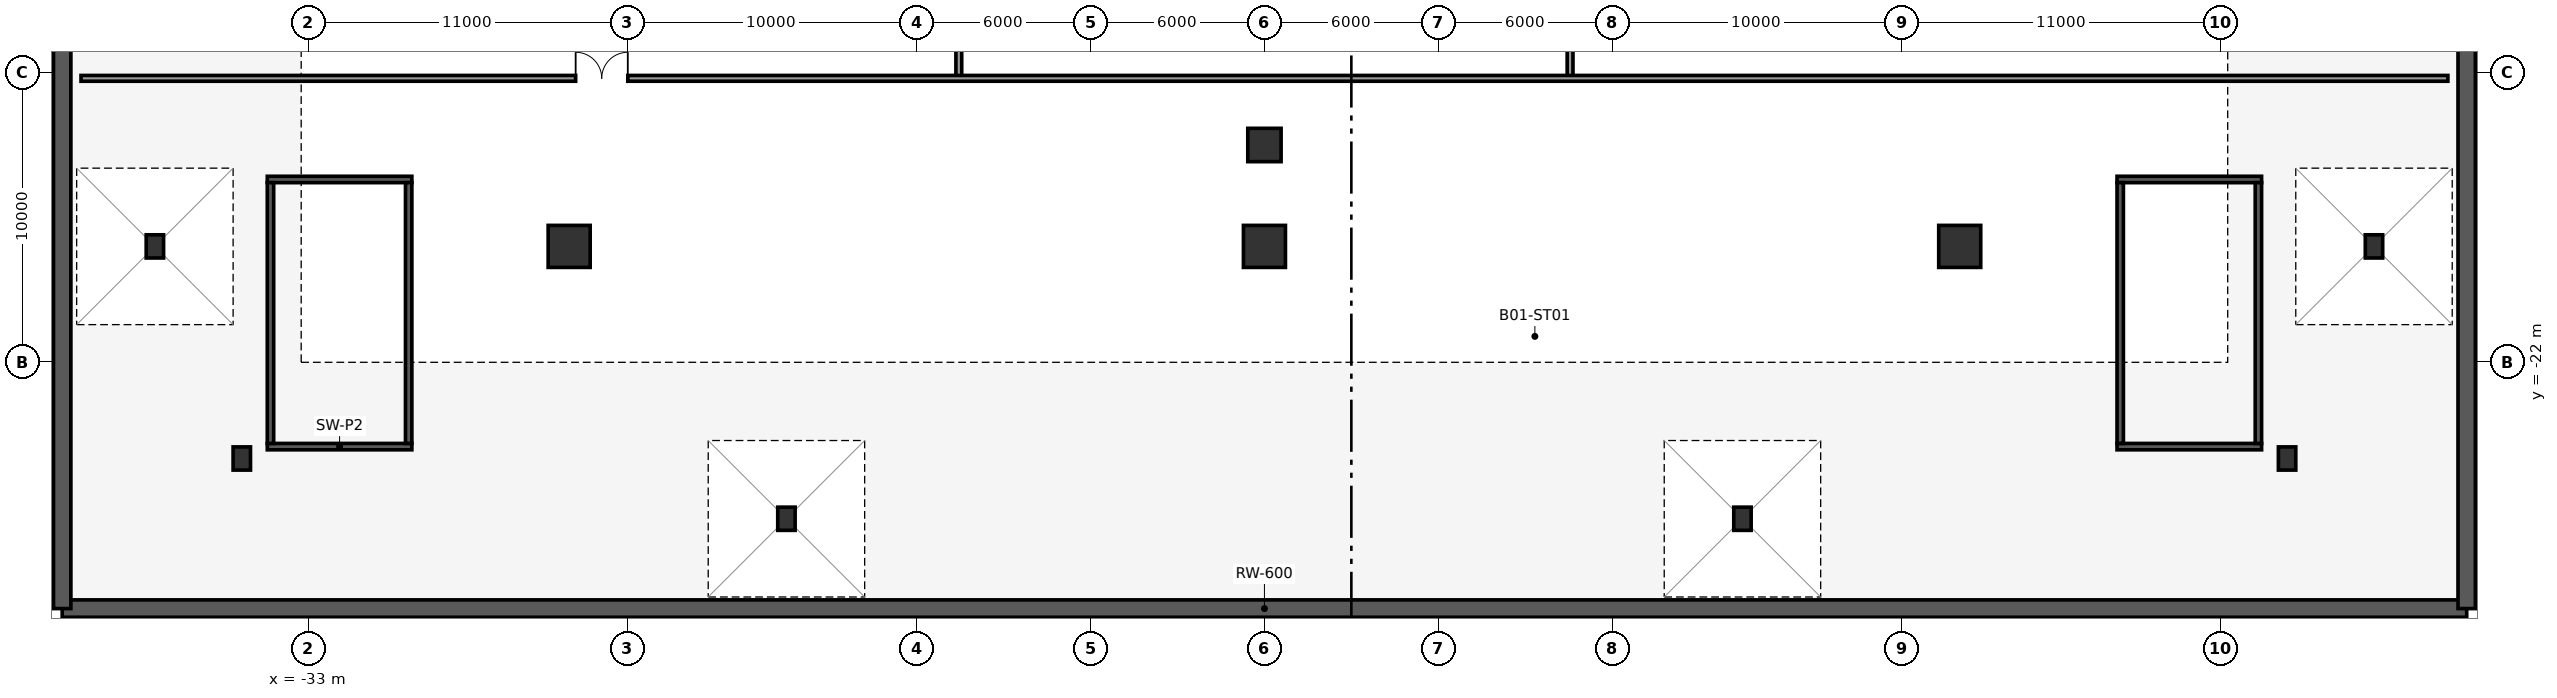
"""IFC4 building model, lengths in metres.
Left out: names, types, materials, properties, quantities, classifications, styles, units other than length and angle.
Written with IfcOpenShell. Run it as: python <this file> out.ifc"""

import sys

from ifc_helpers import new_model, si_unit, direction, frame, frame_2d, origin, origin_2d, place, context, subcontext, project, spatial, rectangle, hollow_rectangle, extrude, element, fill, save


model = new_model("IFC4")
c1 = context("Model", 3, precision=1e-05, world=origin(), true_north=direction((0.0, 1.0)))
c2 = subcontext(c1, "Body", "Model", "MODEL_VIEW")
j1 = project(units=[si_unit("LENGTHUNIT", "METRE"), si_unit("PLANEANGLEUNIT", "RADIAN")], contexts=[c1])
p1 = place(None, origin())
s1 = spatial("IfcSite", under=j1, at=p1, CompositionType="ELEMENT")
p2 = place(p1, origin())
s2 = spatial("IfcBuilding", under=s1, at=p2, CompositionType="ELEMENT")
p3 = place(p2, frame((0.0, 0.0, -5.4)))
s3 = spatial("IfcBuildingStorey", under=s2, at=p3, CompositionType="ELEMENT", Elevation=-5.4)
p4 = place(p3, frame((-41.5, -30.5, 0.0), z_axis=(0.0, 0.0, 1.0), x_axis=(1.0, 0.0, 0.0)))
e1 = element("IfcWall", 1, at=p4, inside=s3, PredefinedType="SHEAR", context=c2, shape_type="SweptSolid", body=[
    extrude(rectangle(XDim=83.0, YDim=0.6, at=frame_2d((41.5, 0.0))), origin(), (0.0, 0.0, 1.0), 5.1),
])
for number, where, z_axis, x_axis in (
    (2, (41.5, -30.5, 0.0), (0.0, 0.0, 1.0), (0.0, 1.0, 0.0)),
    (3, (-41.5, 30.5, 0.0), (0.0, 0.0, 1.0), (0.0, -1.0, 0.0)),
):
    element("IfcWall", number, at=place(p3, frame(where, z_axis=z_axis, x_axis=x_axis)), inside=s3, PredefinedType="SHEAR", context=c2, shape_type="SweptSolid", body=[
        extrude(rectangle(XDim=61.0, YDim=0.6, at=frame_2d((30.5, 0.0))), origin(), (0.0, 0.0, 1.0), 5.1),
    ])
p5 = place(p3, frame((0.0, -14.5, 0.0), z_axis=(0.0, 0.0, 1.0), x_axis=(1.0, 0.0, 0.0)))
e4 = element("IfcColumn", 4, at=p5, inside=s3, PredefinedType="COLUMN", context=c2, shape_type="SweptSolid", body=[
    extrude(rectangle(XDim=1.15, YDim=1.15, at=origin_2d()), origin(), (0.0, 0.0, 1.0), 5.4),
])
for number, where, z_axis, x_axis in (
    (5, (-24.0, -18.0, 0.0), (0.0, 0.0, 1.0), (1.0, 0.0, 0.0)),
    (6, (24.0, -18.0, 0.0), (0.0, 0.0, 1.0), (1.0, 0.0, 0.0)),
    (7, (0.0, -18.0, 0.0), (0.0, 0.0, 1.0), (1.0, 0.0, 0.0)),
):
    element("IfcColumn", number, at=place(p3, frame(where, z_axis=z_axis, x_axis=x_axis)), inside=s3, PredefinedType="COLUMN", context=c2, shape_type="SweptSolid", body=[
        extrude(rectangle(XDim=1.45, YDim=1.45, at=origin_2d()), origin(), (0.0, 0.0, 1.0), 5.4),
    ])
for number, where, z_axis, x_axis in (
    (8, (-38.3, -18.0, 0.0), (0.0, 0.0, 1.0), (1.0, 0.0, 0.0)),
    (9, (38.3, -18.0, 0.0), (0.0, 0.0, 1.0), (1.0, 0.0, 0.0)),
    (10, (-16.5, -27.4, 0.0), (0.0, 0.0, 1.0), (1.0, 0.0, 0.0)),
    (11, (16.5, -27.4, 0.0), (0.0, 0.0, 1.0), (1.0, 0.0, 0.0)),
    (12, (-35.3, -25.32, 0.0), (0.0, 0.0, 1.0), (1.0, 0.0, 0.0)),
    (13, (35.3, -25.32, 0.0), (0.0, 0.0, 1.0), (1.0, 0.0, 0.0)),
):
    element("IfcColumn", number, at=place(p3, frame(where, z_axis=z_axis, x_axis=x_axis)), inside=s3, PredefinedType="COLUMN", context=c2, shape_type="SweptSolid", body=[
        extrude(hollow_rectangle(XDim=0.6, YDim=0.8, WallThickness=0.05, at=origin_2d()), origin(), (0.0, 0.0, 1.0), 5.4),
    ])
for number, where, z_axis, x_axis in (
    (14, (-34.42, -24.91, 0.0), (0.0, 0.0, 1.0), (1.0, 0.0, 0.0)),
    (15, (-34.42, -15.69, 0.0), (0.0, 0.0, 1.0), (1.0, 0.0, 0.0)),
):
    element("IfcWall", number, at=place(p3, frame(where, z_axis=z_axis, x_axis=x_axis)), inside=s3, PredefinedType="SHEAR", context=c2, shape_type="SweptSolid", body=[
        extrude(rectangle(XDim=4.99, YDim=0.22, at=frame_2d((2.495, 0.0))), origin(), (0.0, 0.0, 1.0), 5.1),
    ])
for number, where, z_axis, x_axis in (
    (16, (-34.31, -24.8, 0.0), (0.0, 0.0, 1.0), (0.0, 1.0, 0.0)),
    (17, (-29.54, -24.8, 0.0), (0.0, 0.0, 1.0), (0.0, 1.0, 0.0)),
):
    element("IfcWall", number, at=place(p3, frame(where, z_axis=z_axis, x_axis=x_axis)), inside=s3, PredefinedType="SHEAR", context=c2, shape_type="SweptSolid", body=[
        extrude(rectangle(XDim=9.0, YDim=0.22, at=frame_2d((4.5, 0.0))), origin(), (0.0, 0.0, 1.0), 5.1),
    ])
for number, where, z_axis, x_axis in (
    (18, (29.43, -24.91, 0.0), (0.0, 0.0, 1.0), (1.0, 0.0, 0.0)),
    (19, (29.43, -15.69, 0.0), (0.0, 0.0, 1.0), (1.0, 0.0, 0.0)),
):
    element("IfcWall", number, at=place(p3, frame(where, z_axis=z_axis, x_axis=x_axis)), inside=s3, PredefinedType="SHEAR", context=c2, shape_type="SweptSolid", body=[
        extrude(rectangle(XDim=4.99, YDim=0.22, at=frame_2d((2.495, 0.0))), origin(), (0.0, 0.0, 1.0), 5.1),
    ])
for number, where, z_axis, x_axis in (
    (20, (29.54, -24.8, 0.0), (0.0, 0.0, 1.0), (0.0, 1.0, 0.0)),
    (21, (34.31, -24.8, 0.0), (0.0, 0.0, 1.0), (0.0, 1.0, 0.0)),
):
    element("IfcWall", number, at=place(p3, frame(where, z_axis=z_axis, x_axis=x_axis)), inside=s3, PredefinedType="SHEAR", context=c2, shape_type="SweptSolid", body=[
        extrude(rectangle(XDim=9.0, YDim=0.22, at=frame_2d((4.5, 0.0))), origin(), (0.0, 0.0, 1.0), 5.1),
    ])
p6 = place(p3, frame((-10.55, -12.2, 0.0), z_axis=(0.0, 0.0, 1.0), x_axis=(0.0, 1.0, 0.0)))
e22 = element("IfcWall", 22, at=p6, inside=s3, PredefinedType="PARTITIONING", context=c2, shape_type="SweptSolid", body=[
    extrude(rectangle(XDim=24.4, YDim=0.2, at=frame_2d((12.2, 0.0))), origin(), (0.0, 0.0, 1.0), 5.1),
])
p7 = place(p6, frame((11.3, 0.0, 0.0)))
e23 = element("IfcOpeningElement", 23, at=p7, cuts=e22, PredefinedType="OPENING", context=c2, shape_type="SweptSolid", body=[
    extrude(rectangle(XDim=1.8, YDim=2.2, at=frame_2d((0.9, 1.1))), frame((0.0, 0.11, 0.0), z_axis=(0.0, -1.0, 0.0), x_axis=(1.0, 0.0, 0.0)), (0.0, 0.0, 1.0), 0.22),
])
p8 = place(p3, frame((10.55, -12.2, 0.0), z_axis=(0.0, 0.0, 1.0), x_axis=(0.0, 1.0, 0.0)))
e24 = element("IfcWall", 24, at=p8, inside=s3, PredefinedType="PARTITIONING", context=c2, shape_type="SweptSolid", body=[
    extrude(rectangle(XDim=24.4, YDim=0.2, at=frame_2d((12.2, 0.0))), origin(), (0.0, 0.0, 1.0), 5.1),
])
p9 = place(p8, frame((11.3, 0.0, 0.0)))
e25 = element("IfcOpeningElement", 25, at=p9, cuts=e24, PredefinedType="OPENING", context=c2, shape_type="SweptSolid", body=[
    extrude(rectangle(XDim=1.8, YDim=2.2, at=frame_2d((0.9, 1.1))), frame((0.0, 0.11, 0.0), z_axis=(0.0, -1.0, 0.0), x_axis=(1.0, 0.0, 0.0)), (0.0, 0.0, 1.0), 0.22),
])
p10 = place(p3, frame((-40.85, -12.2, 0.0), z_axis=(0.0, 0.0, 1.0), x_axis=(1.0, 0.0, 0.0)))
e26 = element("IfcWall", 26, at=p10, inside=s3, PredefinedType="PARTITIONING", context=c2, shape_type="SweptSolid", body=[
    extrude(rectangle(XDim=81.7, YDim=0.2, at=frame_2d((40.85, 0.0))), origin(), (0.0, 0.0, 1.0), 5.1),
])
p11 = place(p10, frame((17.074, 0.0, 0.0)))
e27 = element("IfcOpeningElement", 27, at=p11, cuts=e26, PredefinedType="OPENING", context=c2, shape_type="SweptSolid", body=[
    extrude(rectangle(XDim=1.8, YDim=2.2, at=frame_2d((0.9, 1.1))), frame((0.0, 0.11, 0.0), z_axis=(0.0, -1.0, 0.0), x_axis=(1.0, 0.0, 0.0)), (0.0, 0.0, 1.0), 0.22),
])
p12 = place(p11, origin())
e28 = element("IfcDoor", 28, at=p12, inside=s3, OperationType="DOUBLE_DOOR_SINGLE_SWING", PredefinedType="DOOR", context=c2, shape_type="SweptSolid", body=[
    extrude(rectangle(XDim=1.8, YDim=2.2, at=frame_2d((0.9, 1.1))), frame((0.0, 0.025, 0.0), z_axis=(0.0, -1.0, 0.0), x_axis=(1.0, 0.0, 0.0)), (0.0, 0.0, 1.0), 0.05),
])
fill(e27, e28)
save(model, sys.argv[1])
